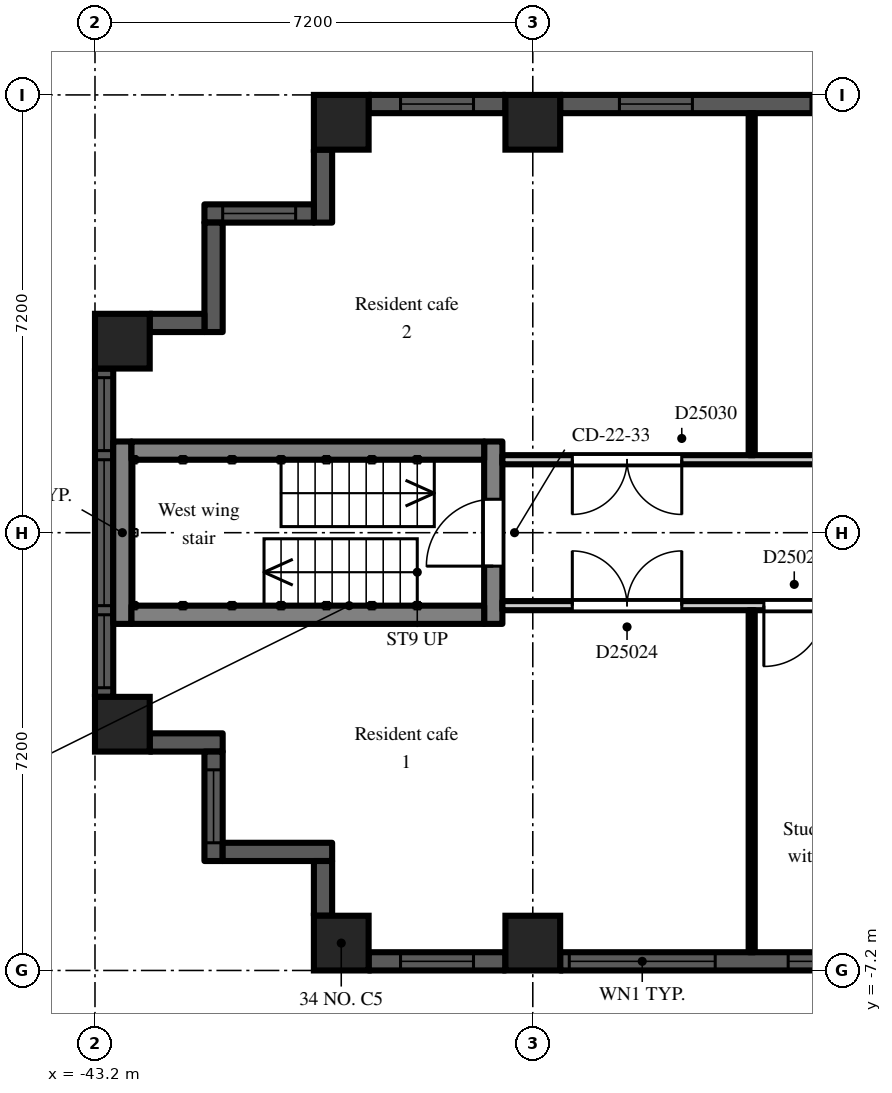
"""IFC4 building model, lengths in metres.
Left out: names, types, materials, properties, quantities, classifications, styles, units other than length and angle.
Written with IfcOpenShell. Run it as: python <this file> out.ifc"""

import sys

from ifc_helpers import new_model, si_unit, direction, frame, frame_2d, origin, origin_2d, place, context, subcontext, project, spatial, rectangle, extrude, element, fill, save


model = new_model("IFC4")
c1 = context("Model", 3, precision=1e-05, world=origin(), true_north=direction((0.0, 1.0)))
c2 = subcontext(c1, "Body", "Model", "MODEL_VIEW")
j1 = project(units=[si_unit("LENGTHUNIT", "METRE"), si_unit("PLANEANGLEUNIT", "RADIAN")], contexts=[c1])
p1 = place(None, origin())
s1 = spatial("IfcSite", under=j1, at=p1, CompositionType="ELEMENT")
p2 = place(p1, origin())
s2 = spatial("IfcBuilding", under=s1, at=p2, CompositionType="ELEMENT")
p3 = place(p2, frame((0.0, 0.0, 170.7)))
s3 = spatial("IfcBuildingStorey", under=s2, at=p3, CompositionType="ELEMENT", Elevation=170.7)
for number, where, z_axis, x_axis in (
    (1, (-42.75, -3.15, 0.0), (0.0, 0.0, 1.0), (1.0, 0.0, 0.0)),
    (2, (-42.75, 3.15, 0.0), (0.0, 0.0, 1.0), (1.0, 0.0, 0.0)),
    (3, (-39.15, -6.75, 0.0), (0.0, 0.0, 1.0), (1.0, 0.0, 0.0)),
    (4, (-39.15, 6.75, 0.0), (0.0, 0.0, 1.0), (1.0, 0.0, 0.0)),
    (5, (-36.0, -6.75, 0.0), (0.0, 0.0, 1.0), (1.0, 0.0, 0.0)),
    (6, (-36.0, 6.75, 0.0), (0.0, 0.0, 1.0), (1.0, 0.0, 0.0)),
):
    element("IfcColumn", number, at=place(p3, frame(where, z_axis=z_axis, x_axis=x_axis)), inside=s3, PredefinedType="COLUMN", context=c2, shape_type="SweptSolid", body=[
        extrude(rectangle(XDim=0.9, YDim=0.9, at=origin_2d()), origin(), (0.0, 0.0, 1.0), 3.0),
    ])
p4 = place(p3, frame((-29.25, 7.05, 0.0), z_axis=(0.0, 0.0, 1.0), x_axis=(-1.0, 0.0, 0.0)))
e7 = element("IfcWall", 7, at=p4, inside=s3, PredefinedType="SOLIDWALL", context=c2, shape_type="SweptSolid", body=[
    extrude(rectangle(XDim=6.3, YDim=0.3, at=frame_2d((3.15, 0.0))), origin(), (0.0, 0.0, 1.0), 2.2),
])
p5 = place(p4, frame((0.975, 0.0, 0.2)))
e8 = element("IfcOpeningElement", 8, at=p5, cuts=e7, PredefinedType="OPENING", context=c2, shape_type="SweptSolid", body=[
    extrude(rectangle(XDim=1.2, YDim=1.85, at=frame_2d((0.6, 0.925))), frame((0.0, 0.16, 0.0), z_axis=(0.0, -1.0, 0.0), x_axis=(1.0, 0.0, 0.0)), (0.0, 0.0, 1.0), 0.32),
])
p6 = place(p4, frame((4.125, 0.0, 0.2)))
e9 = element("IfcOpeningElement", 9, at=p6, cuts=e7, PredefinedType="OPENING", context=c2, shape_type="SweptSolid", body=[
    extrude(rectangle(XDim=1.2, YDim=1.85, at=frame_2d((0.6, 0.925))), frame((0.0, 0.16, 0.0), z_axis=(0.0, -1.0, 0.0), x_axis=(1.0, 0.0, 0.0)), (0.0, 0.0, 1.0), 0.32),
])
p7 = place(p3, frame((-36.45, 7.05, 0.0), z_axis=(0.0, 0.0, 1.0), x_axis=(-1.0, 0.0, 0.0)))
e10 = element("IfcWall", 10, at=p7, inside=s3, PredefinedType="SOLIDWALL", context=c2, shape_type="SweptSolid", body=[
    extrude(rectangle(XDim=2.25, YDim=0.3, at=frame_2d((1.125, 0.0))), origin(), (0.0, 0.0, 1.0), 2.2),
])
p8 = place(p7, frame((0.525, 0.0, 0.2)))
e11 = element("IfcOpeningElement", 11, at=p8, cuts=e10, PredefinedType="OPENING", context=c2, shape_type="SweptSolid", body=[
    extrude(rectangle(XDim=1.2, YDim=1.85, at=frame_2d((0.6, 0.925))), frame((0.0, 0.16, 0.0), z_axis=(0.0, -1.0, 0.0), x_axis=(1.0, 0.0, 0.0)), (0.0, 0.0, 1.0), 0.32),
])
p9 = place(p3, frame((-39.45, 6.3, 0.0), z_axis=(0.0, 0.0, 1.0), x_axis=(0.0, -1.0, 0.0)))
e12 = element("IfcWall", 12, at=p9, inside=s3, PredefinedType="SOLIDWALL", context=c2, shape_type="SweptSolid", body=[
    extrude(rectangle(XDim=1.2, YDim=0.3, at=frame_2d((0.6, 0.0))), origin(), (0.0, 0.0, 1.0), 2.6),
])
p10 = place(p3, frame((-39.6, 5.25, 0.0), z_axis=(0.0, 0.0, 1.0), x_axis=(-1.0, 0.0, 0.0)))
e13 = element("IfcWall", 13, at=p10, inside=s3, PredefinedType="SOLIDWALL", context=c2, shape_type="SweptSolid", body=[
    extrude(rectangle(XDim=1.8, YDim=0.3, at=frame_2d((0.9, 0.0))), origin(), (0.0, 0.0, 1.0), 2.6),
])
p11 = place(p10, frame((0.3, 0.0, 0.2)))
e14 = element("IfcOpeningElement", 14, at=p11, cuts=e13, PredefinedType="OPENING", context=c2, shape_type="SweptSolid", body=[
    extrude(rectangle(XDim=1.2, YDim=1.85, at=frame_2d((0.6, 0.925))), frame((0.0, 0.16, 0.0), z_axis=(0.0, -1.0, 0.0), x_axis=(1.0, 0.0, 0.0)), (0.0, 0.0, 1.0), 0.32),
])
p12 = place(p3, frame((-41.25, 5.1, 0.0), z_axis=(0.0, 0.0, 1.0), x_axis=(0.0, -1.0, 0.0)))
e15 = element("IfcWall", 15, at=p12, inside=s3, PredefinedType="SOLIDWALL", context=c2, shape_type="SweptSolid", body=[
    extrude(rectangle(XDim=1.8, YDim=0.3, at=frame_2d((0.9, 0.0))), origin(), (0.0, 0.0, 1.0), 2.6),
])
p13 = place(p3, frame((-41.4, 3.45, 0.0), z_axis=(0.0, 0.0, 1.0), x_axis=(-1.0, 0.0, 0.0)))
e16 = element("IfcWall", 16, at=p13, inside=s3, PredefinedType="SOLIDWALL", context=c2, shape_type="SweptSolid", body=[
    extrude(rectangle(XDim=0.9, YDim=0.3, at=frame_2d((0.45, 0.0))), origin(), (0.0, 0.0, 1.0), 2.6),
])
p14 = place(p3, frame((-43.05, 2.7, 0.0), z_axis=(0.0, 0.0, 1.0), x_axis=(0.0, -1.0, 0.0)))
e17 = element("IfcWall", 17, at=p14, inside=s3, PredefinedType="SOLIDWALL", context=c2, shape_type="SweptSolid", body=[
    extrude(rectangle(XDim=5.4, YDim=0.3, at=frame_2d((2.7, 0.0))), origin(), (0.0, 0.0, 1.0), 2.2),
])
p15 = place(p14, frame((1.5, 0.0, 0.2)))
e18 = element("IfcOpeningElement", 18, at=p15, cuts=e17, PredefinedType="OPENING", context=c2, shape_type="SweptSolid", body=[
    extrude(rectangle(XDim=2.4, YDim=1.85, at=frame_2d((1.2, 0.925))), frame((0.0, 0.16, 0.0), z_axis=(0.0, -1.0, 0.0), x_axis=(1.0, 0.0, 0.0)), (0.0, 0.0, 1.0), 0.32),
])
p16 = place(p14, frame((0.15, 0.0, 0.2)))
e19 = element("IfcOpeningElement", 19, at=p16, cuts=e17, PredefinedType="OPENING", context=c2, shape_type="SweptSolid", body=[
    extrude(rectangle(XDim=1.2, YDim=1.85, at=frame_2d((0.6, 0.925))), frame((0.0, 0.16, 0.0), z_axis=(0.0, -1.0, 0.0), x_axis=(1.0, 0.0, 0.0)), (0.0, 0.0, 1.0), 0.32),
])
p17 = place(p14, frame((4.05, 0.0, 0.2)))
e20 = element("IfcOpeningElement", 20, at=p17, cuts=e17, PredefinedType="OPENING", context=c2, shape_type="SweptSolid", body=[
    extrude(rectangle(XDim=1.2, YDim=1.85, at=frame_2d((0.6, 0.925))), frame((0.0, 0.16, 0.0), z_axis=(0.0, -1.0, 0.0), x_axis=(1.0, 0.0, 0.0)), (0.0, 0.0, 1.0), 0.32),
])
p18 = place(p3, frame((-42.3, -3.45, 0.0), z_axis=(0.0, 0.0, 1.0), x_axis=(1.0, 0.0, 0.0)))
e21 = element("IfcWall", 21, at=p18, inside=s3, PredefinedType="SOLIDWALL", context=c2, shape_type="SweptSolid", body=[
    extrude(rectangle(XDim=1.2, YDim=0.3, at=frame_2d((0.6, 0.0))), origin(), (0.0, 0.0, 1.0), 2.6),
])
p19 = place(p3, frame((-41.25, -3.6, 0.0), z_axis=(0.0, 0.0, 1.0), x_axis=(0.0, -1.0, 0.0)))
e22 = element("IfcWall", 22, at=p19, inside=s3, PredefinedType="SOLIDWALL", context=c2, shape_type="SweptSolid", body=[
    extrude(rectangle(XDim=1.8, YDim=0.3, at=frame_2d((0.9, 0.0))), origin(), (0.0, 0.0, 1.0), 2.6),
])
p20 = place(p19, frame((0.3, 0.0, 0.2)))
e23 = element("IfcOpeningElement", 23, at=p20, cuts=e22, PredefinedType="OPENING", context=c2, shape_type="SweptSolid", body=[
    extrude(rectangle(XDim=1.2, YDim=1.85, at=frame_2d((0.6, 0.925))), frame((0.0, 0.16, 0.0), z_axis=(0.0, -1.0, 0.0), x_axis=(1.0, 0.0, 0.0)), (0.0, 0.0, 1.0), 0.32),
])
p21 = place(p3, frame((-41.1, -5.25, 0.0), z_axis=(0.0, 0.0, 1.0), x_axis=(1.0, 0.0, 0.0)))
e24 = element("IfcWall", 24, at=p21, inside=s3, PredefinedType="SOLIDWALL", context=c2, shape_type="SweptSolid", body=[
    extrude(rectangle(XDim=1.8, YDim=0.3, at=frame_2d((0.9, 0.0))), origin(), (0.0, 0.0, 1.0), 2.6),
])
p22 = place(p3, frame((-39.45, -5.4, 0.0), z_axis=(0.0, 0.0, 1.0), x_axis=(0.0, -1.0, 0.0)))
e25 = element("IfcWall", 25, at=p22, inside=s3, PredefinedType="SOLIDWALL", context=c2, shape_type="SweptSolid", body=[
    extrude(rectangle(XDim=0.9, YDim=0.3, at=frame_2d((0.45, 0.0))), origin(), (0.0, 0.0, 1.0), 2.6),
])
p23 = place(p3, frame((-38.7, -7.05, 0.0), z_axis=(0.0, 0.0, 1.0), x_axis=(1.0, 0.0, 0.0)))
e26 = element("IfcWall", 26, at=p23, inside=s3, PredefinedType="SOLIDWALL", context=c2, shape_type="SweptSolid", body=[
    extrude(rectangle(XDim=2.25, YDim=0.3, at=frame_2d((1.125, 0.0))), origin(), (0.0, 0.0, 1.0), 2.2),
])
p24 = place(p23, frame((0.525, 0.0, 0.2)))
e27 = element("IfcOpeningElement", 27, at=p24, cuts=e26, PredefinedType="OPENING", context=c2, shape_type="SweptSolid", body=[
    extrude(rectangle(XDim=1.2, YDim=1.85, at=frame_2d((0.6, 0.925))), frame((0.0, 0.16, 0.0), z_axis=(0.0, -1.0, 0.0), x_axis=(1.0, 0.0, 0.0)), (0.0, 0.0, 1.0), 0.32),
])
p25 = place(p3, frame((-35.55, -7.05, 0.0), z_axis=(0.0, 0.0, 1.0), x_axis=(1.0, 0.0, 0.0)))
e28 = element("IfcWall", 28, at=p25, inside=s3, PredefinedType="SOLIDWALL", context=c2, shape_type="SweptSolid", body=[
    extrude(rectangle(XDim=6.3, YDim=0.3, at=frame_2d((3.15, 0.0))), origin(), (0.0, 0.0, 1.0), 2.2),
])
p26 = place(p25, frame((0.15, 0.0, 0.2)))
e29 = element("IfcOpeningElement", 29, at=p26, cuts=e28, PredefinedType="OPENING", context=c2, shape_type="SweptSolid", body=[
    extrude(rectangle(XDim=2.4, YDim=1.85, at=frame_2d((1.2, 0.925))), frame((0.0, 0.16, 0.0), z_axis=(0.0, -1.0, 0.0), x_axis=(1.0, 0.0, 0.0)), (0.0, 0.0, 1.0), 0.32),
])
p27 = place(p25, frame((3.75, 0.0, 0.2)))
e30 = element("IfcOpeningElement", 30, at=p27, cuts=e28, PredefinedType="OPENING", context=c2, shape_type="SweptSolid", body=[
    extrude(rectangle(XDim=2.4, YDim=1.85, at=frame_2d((1.2, 0.925))), frame((0.0, 0.16, 0.0), z_axis=(0.0, -1.0, 0.0), x_axis=(1.0, 0.0, 0.0)), (0.0, 0.0, 1.0), 0.32),
])
p28 = place(p3, frame((-36.65, -1.5, 0.0), z_axis=(0.0, 0.0, 1.0), x_axis=(0.0, 1.0, 0.0)))
e31 = element("IfcWall", 31, at=p28, inside=s3, PredefinedType="SHEAR", context=c2, shape_type="SweptSolid", body=[
    extrude(rectangle(XDim=3.0, YDim=0.3, at=frame_2d((1.5, 0.0))), origin(), (0.0, 0.0, 1.0), 2.6),
])
p29 = place(p28, frame((0.95, 0.0, 0.0)))
e32 = element("IfcOpeningElement", 32, at=p29, cuts=e31, PredefinedType="OPENING", context=c2, shape_type="SweptSolid", body=[
    extrude(rectangle(XDim=1.1, YDim=2.1, at=frame_2d((0.55, 1.05))), frame((0.0, 0.16, 0.0), z_axis=(0.0, -1.0, 0.0), x_axis=(1.0, 0.0, 0.0)), (0.0, 0.0, 1.0), 0.32),
])
p30 = place(p3, frame((-42.75, -1.5, 0.0), z_axis=(0.0, 0.0, 1.0), x_axis=(0.0, 1.0, 0.0)))
e33 = element("IfcWall", 33, at=p30, inside=s3, PredefinedType="SHEAR", context=c2, shape_type="SweptSolid", body=[
    extrude(rectangle(XDim=3.0, YDim=0.3, at=frame_2d((1.5, 0.0))), origin(), (0.0, 0.0, 1.0), 2.6),
])
for number, where, z_axis, x_axis in (
    (34, (-36.8, -1.35, 0.0), (0.0, 0.0, 1.0), (-1.0, 0.0, 0.0)),
    (35, (-36.8, 1.35, 0.0), (0.0, 0.0, 1.0), (-1.0, 0.0, 0.0)),
):
    element("IfcWall", number, at=place(p3, frame(where, z_axis=z_axis, x_axis=x_axis)), inside=s3, PredefinedType="SHEAR", context=c2, shape_type="SweptSolid", body=[
        extrude(rectangle(XDim=5.8, YDim=0.3, at=frame_2d((2.9, 0.0))), origin(), (0.0, 0.0, 1.0), 2.6),
    ])
p31 = place(p3, frame((-36.5, -1.2, 0.0), z_axis=(0.0, 0.0, 1.0), x_axis=(1.0, 0.0, 0.0)))
e36 = element("IfcWall", 36, at=p31, inside=s3, PredefinedType="PARTITIONING", context=c2, shape_type="SweptSolid", body=[
    extrude(rectangle(XDim=14.9, YDim=0.15, at=frame_2d((7.45, 0.0))), origin(), (0.0, 0.0, 1.0), 2.6),
])
p32 = place(p31, frame((10.4, 0.0, 0.0)))
e37 = element("IfcOpeningElement", 37, at=p32, cuts=e36, PredefinedType="OPENING", context=c2, shape_type="SweptSolid", body=[
    extrude(rectangle(XDim=1.8, YDim=2.1, at=frame_2d((0.9, 1.05))), frame((0.0, 0.085, 0.0), z_axis=(0.0, -1.0, 0.0), x_axis=(1.0, 0.0, 0.0)), (0.0, 0.0, 1.0), 0.17),
])
p33 = place(p31, frame((4.3, 0.0, 0.0)))
e38 = element("IfcOpeningElement", 38, at=p33, cuts=e36, PredefinedType="OPENING", context=c2, shape_type="SweptSolid", body=[
    extrude(rectangle(XDim=1.0, YDim=2.1, at=frame_2d((0.5, 1.05))), frame((0.0, 0.085, 0.0), z_axis=(0.0, -1.0, 0.0), x_axis=(1.0, 0.0, 0.0)), (0.0, 0.0, 1.0), 0.17),
])
p34 = place(p31, frame((1.15, 0.0, 0.0)))
e39 = element("IfcOpeningElement", 39, at=p34, cuts=e36, PredefinedType="OPENING", context=c2, shape_type="SweptSolid", body=[
    extrude(rectangle(XDim=1.8, YDim=2.1, at=frame_2d((0.9, 1.05))), frame((0.0, 0.085, 0.0), z_axis=(0.0, -1.0, 0.0), x_axis=(1.0, 0.0, 0.0)), (0.0, 0.0, 1.0), 0.17),
])
p35 = place(p3, frame((-36.5, 1.2, 0.0), z_axis=(0.0, 0.0, 1.0), x_axis=(1.0, 0.0, 0.0)))
e40 = element("IfcWall", 40, at=p35, inside=s3, PredefinedType="PARTITIONING", context=c2, shape_type="SweptSolid", body=[
    extrude(rectangle(XDim=14.9, YDim=0.15, at=frame_2d((7.45, 0.0))), origin(), (0.0, 0.0, 1.0), 2.6),
])
p36 = place(p35, frame((13.55, 0.0, 0.0)))
e41 = element("IfcOpeningElement", 41, at=p36, cuts=e40, PredefinedType="OPENING", context=c2, shape_type="SweptSolid", body=[
    extrude(rectangle(XDim=0.9, YDim=2.1, at=frame_2d((0.45, 1.05))), frame((0.0, 0.085, 0.0), z_axis=(0.0, -1.0, 0.0), x_axis=(1.0, 0.0, 0.0)), (0.0, 0.0, 1.0), 0.17),
])
p37 = place(p35, frame((11.75, 0.0, 0.0)))
e42 = element("IfcOpeningElement", 42, at=p37, cuts=e40, PredefinedType="OPENING", context=c2, shape_type="SweptSolid", body=[
    extrude(rectangle(XDim=0.9, YDim=2.1, at=frame_2d((0.45, 1.05))), frame((0.0, 0.085, 0.0), z_axis=(0.0, -1.0, 0.0), x_axis=(1.0, 0.0, 0.0)), (0.0, 0.0, 1.0), 0.17),
])
p38 = place(p35, frame((9.95, 0.0, 0.0)))
e43 = element("IfcOpeningElement", 43, at=p38, cuts=e40, PredefinedType="OPENING", context=c2, shape_type="SweptSolid", body=[
    extrude(rectangle(XDim=0.9, YDim=2.1, at=frame_2d((0.45, 1.05))), frame((0.0, 0.085, 0.0), z_axis=(0.0, -1.0, 0.0), x_axis=(1.0, 0.0, 0.0)), (0.0, 0.0, 1.0), 0.17),
])
p39 = place(p35, frame((8.15, 0.0, 0.0)))
e44 = element("IfcOpeningElement", 44, at=p39, cuts=e40, PredefinedType="OPENING", context=c2, shape_type="SweptSolid", body=[
    extrude(rectangle(XDim=0.9, YDim=2.1, at=frame_2d((0.45, 1.05))), frame((0.0, 0.085, 0.0), z_axis=(0.0, -1.0, 0.0), x_axis=(1.0, 0.0, 0.0)), (0.0, 0.0, 1.0), 0.17),
])
p40 = place(p35, frame((5.45, 0.0, 0.0)))
e45 = element("IfcOpeningElement", 45, at=p40, cuts=e40, PredefinedType="OPENING", context=c2, shape_type="SweptSolid", body=[
    extrude(rectangle(XDim=0.9, YDim=2.1, at=frame_2d((0.45, 1.05))), frame((0.0, 0.085, 0.0), z_axis=(0.0, -1.0, 0.0), x_axis=(1.0, 0.0, 0.0)), (0.0, 0.0, 1.0), 0.17),
])
p41 = place(p35, frame((1.15, 0.0, 0.0)))
e46 = element("IfcOpeningElement", 46, at=p41, cuts=e40, PredefinedType="OPENING", context=c2, shape_type="SweptSolid", body=[
    extrude(rectangle(XDim=1.8, YDim=2.1, at=frame_2d((0.9, 1.05))), frame((0.0, 0.085, 0.0), z_axis=(0.0, -1.0, 0.0), x_axis=(1.0, 0.0, 0.0)), (0.0, 0.0, 1.0), 0.17),
])
for number, where, z_axis, x_axis in (
    (47, (-32.4, -6.9, 0.0), (0.0, 0.0, 1.0), (0.0, 1.0, 0.0)),
    (48, (-32.4, 1.275, 0.0), (0.0, 0.0, 1.0), (0.0, 1.0, 0.0)),
):
    element("IfcWall", number, at=place(p3, frame(where, z_axis=z_axis, x_axis=x_axis)), inside=s3, PredefinedType="PARTITIONING", context=c2, shape_type="SweptSolid", body=[
        extrude(rectangle(XDim=5.625, YDim=0.1, at=frame_2d((2.812, 0.0))), origin(), (0.0, 0.0, 1.0), 2.6),
    ])
p42 = place(p5, origin())
e49 = element("IfcWindow", 49, at=p42, inside=s3, PartitioningType="SINGLE_PANEL", PredefinedType="WINDOW", context=c2, shape_type="SweptSolid", body=[
    extrude(rectangle(XDim=1.2, YDim=1.85, at=frame_2d((0.6, 0.925))), frame((0.0, 0.03, 0.0), z_axis=(0.0, -1.0, 0.0), x_axis=(1.0, 0.0, 0.0)), (0.0, 0.0, 1.0), 0.06),
])
fill(e8, e49)
p43 = place(p6, origin())
e50 = element("IfcWindow", 50, at=p43, inside=s3, PartitioningType="SINGLE_PANEL", PredefinedType="WINDOW", context=c2, shape_type="SweptSolid", body=[
    extrude(rectangle(XDim=1.2, YDim=1.85, at=frame_2d((0.6, 0.925))), frame((0.0, 0.03, 0.0), z_axis=(0.0, -1.0, 0.0), x_axis=(1.0, 0.0, 0.0)), (0.0, 0.0, 1.0), 0.06),
])
fill(e9, e50)
p44 = place(p8, origin())
e51 = element("IfcWindow", 51, at=p44, inside=s3, PartitioningType="SINGLE_PANEL", PredefinedType="WINDOW", context=c2, shape_type="SweptSolid", body=[
    extrude(rectangle(XDim=1.2, YDim=1.85, at=frame_2d((0.6, 0.925))), frame((0.0, 0.03, 0.0), z_axis=(0.0, -1.0, 0.0), x_axis=(1.0, 0.0, 0.0)), (0.0, 0.0, 1.0), 0.06),
])
fill(e11, e51)
p45 = place(p11, origin())
e52 = element("IfcWindow", 52, at=p45, inside=s3, PartitioningType="SINGLE_PANEL", PredefinedType="WINDOW", context=c2, shape_type="SweptSolid", body=[
    extrude(rectangle(XDim=1.2, YDim=1.85, at=frame_2d((0.6, 0.925))), frame((0.0, 0.03, 0.0), z_axis=(0.0, -1.0, 0.0), x_axis=(1.0, 0.0, 0.0)), (0.0, 0.0, 1.0), 0.06),
])
fill(e14, e52)
p46 = place(p15, origin())
e53 = element("IfcWindow", 53, at=p46, inside=s3, PartitioningType="SINGLE_PANEL", PredefinedType="WINDOW", context=c2, shape_type="SweptSolid", body=[
    extrude(rectangle(XDim=2.4, YDim=1.85, at=frame_2d((1.2, 0.925))), frame((0.0, 0.03, 0.0), z_axis=(0.0, -1.0, 0.0), x_axis=(1.0, 0.0, 0.0)), (0.0, 0.0, 1.0), 0.06),
])
fill(e18, e53)
p47 = place(p16, origin())
e54 = element("IfcWindow", 54, at=p47, inside=s3, PartitioningType="SINGLE_PANEL", PredefinedType="WINDOW", context=c2, shape_type="SweptSolid", body=[
    extrude(rectangle(XDim=1.2, YDim=1.85, at=frame_2d((0.6, 0.925))), frame((0.0, 0.03, 0.0), z_axis=(0.0, -1.0, 0.0), x_axis=(1.0, 0.0, 0.0)), (0.0, 0.0, 1.0), 0.06),
])
fill(e19, e54)
p48 = place(p17, origin())
e55 = element("IfcWindow", 55, at=p48, inside=s3, PartitioningType="SINGLE_PANEL", PredefinedType="WINDOW", context=c2, shape_type="SweptSolid", body=[
    extrude(rectangle(XDim=1.2, YDim=1.85, at=frame_2d((0.6, 0.925))), frame((0.0, 0.03, 0.0), z_axis=(0.0, -1.0, 0.0), x_axis=(1.0, 0.0, 0.0)), (0.0, 0.0, 1.0), 0.06),
])
fill(e20, e55)
p49 = place(p20, origin())
e56 = element("IfcWindow", 56, at=p49, inside=s3, PartitioningType="SINGLE_PANEL", PredefinedType="WINDOW", context=c2, shape_type="SweptSolid", body=[
    extrude(rectangle(XDim=1.2, YDim=1.85, at=frame_2d((0.6, 0.925))), frame((0.0, 0.03, 0.0), z_axis=(0.0, -1.0, 0.0), x_axis=(1.0, 0.0, 0.0)), (0.0, 0.0, 1.0), 0.06),
])
fill(e23, e56)
p50 = place(p24, origin())
e57 = element("IfcWindow", 57, at=p50, inside=s3, PartitioningType="SINGLE_PANEL", PredefinedType="WINDOW", context=c2, shape_type="SweptSolid", body=[
    extrude(rectangle(XDim=1.2, YDim=1.85, at=frame_2d((0.6, 0.925))), frame((0.0, 0.03, 0.0), z_axis=(0.0, -1.0, 0.0), x_axis=(1.0, 0.0, 0.0)), (0.0, 0.0, 1.0), 0.06),
])
fill(e27, e57)
p51 = place(p26, origin())
e58 = element("IfcWindow", 58, at=p51, inside=s3, PartitioningType="SINGLE_PANEL", PredefinedType="WINDOW", context=c2, shape_type="SweptSolid", body=[
    extrude(rectangle(XDim=2.4, YDim=1.85, at=frame_2d((1.2, 0.925))), frame((0.0, 0.03, 0.0), z_axis=(0.0, -1.0, 0.0), x_axis=(1.0, 0.0, 0.0)), (0.0, 0.0, 1.0), 0.06),
])
fill(e29, e58)
p52 = place(p27, origin())
e59 = element("IfcWindow", 59, at=p52, inside=s3, PartitioningType="SINGLE_PANEL", PredefinedType="WINDOW", context=c2, shape_type="SweptSolid", body=[
    extrude(rectangle(XDim=2.4, YDim=1.85, at=frame_2d((1.2, 0.925))), frame((0.0, 0.03, 0.0), z_axis=(0.0, -1.0, 0.0), x_axis=(1.0, 0.0, 0.0)), (0.0, 0.0, 1.0), 0.06),
])
fill(e30, e59)
p53 = place(p29, origin())
e60 = element("IfcDoor", 60, at=p53, inside=s3, OperationType="SINGLE_SWING_LEFT", PredefinedType="DOOR", context=c2, shape_type="SweptSolid", body=[
    extrude(rectangle(XDim=1.1, YDim=2.1, at=frame_2d((0.55, 1.05))), frame((0.0, 0.025, 0.0), z_axis=(0.0, -1.0, 0.0), x_axis=(1.0, 0.0, 0.0)), (0.0, 0.0, 1.0), 0.05),
])
fill(e32, e60)
p54 = place(p33, frame((1.0, 0.0, 0.0), z_axis=(0.0, 0.0, 1.0), x_axis=(-1.0, 0.0, 0.0)))
e61 = element("IfcDoor", 61, at=p54, inside=s3, OperationType="SINGLE_SWING_RIGHT", PredefinedType="DOOR", context=c2, shape_type="SweptSolid", body=[
    extrude(rectangle(XDim=1.0, YDim=2.1, at=frame_2d((0.5, 1.05))), frame((0.0, 0.025, 0.0), z_axis=(0.0, -1.0, 0.0), x_axis=(1.0, 0.0, 0.0)), (0.0, 0.0, 1.0), 0.05),
])
fill(e38, e61)
p55 = place(p34, origin())
e62 = element("IfcDoor", 62, at=p55, inside=s3, OperationType="DOUBLE_DOOR_DOUBLE_SWING", PredefinedType="DOOR", context=c2, shape_type="SweptSolid", body=[
    extrude(rectangle(XDim=1.8, YDim=2.1, at=frame_2d((0.9, 1.05))), frame((0.0, 0.025, 0.0), z_axis=(0.0, -1.0, 0.0), x_axis=(1.0, 0.0, 0.0)), (0.0, 0.0, 1.0), 0.05),
])
fill(e39, e62)
p56 = place(p41, frame((1.8, 0.0, 0.0), z_axis=(0.0, 0.0, 1.0), x_axis=(-1.0, 0.0, 0.0)))
e63 = element("IfcDoor", 63, at=p56, inside=s3, OperationType="DOUBLE_DOOR_DOUBLE_SWING", PredefinedType="DOOR", context=c2, shape_type="SweptSolid", body=[
    extrude(rectangle(XDim=1.8, YDim=2.1, at=frame_2d((0.9, 1.05))), frame((0.0, 0.025, 0.0), z_axis=(0.0, -1.0, 0.0), x_axis=(1.0, 0.0, 0.0)), (0.0, 0.0, 1.0), 0.05),
])
fill(e46, e63)
save(model, sys.argv[1])
